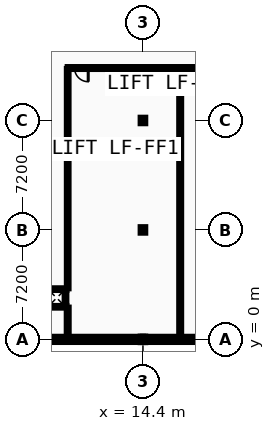
"""IFC4 building model, lengths in metres.
Left out: names, types, materials, properties, quantities, classifications, styles, units other than length and angle.
Written with IfcOpenShell. Run it as: python <this file> out.ifc"""

import sys

from ifc_helpers import new_model, si_unit, direction, frame, frame_2d, origin, origin_2d, place, context, subcontext, project, spatial, rectangle, i_section, extrude, element, fill, save


model = new_model("IFC4")
c1 = context("Model", 3, precision=1e-05, world=origin(), true_north=direction((0.0, 1.0)))
c2 = subcontext(c1, "Body", "Model", "MODEL_VIEW")
j1 = project(units=[si_unit("LENGTHUNIT", "METRE"), si_unit("PLANEANGLEUNIT", "RADIAN")], contexts=[c1])
p1 = place(None, origin())
s1 = spatial("IfcSite", under=j1, at=p1, CompositionType="ELEMENT")
p2 = place(p1, origin())
s2 = spatial("IfcBuilding", under=s1, at=p2, CompositionType="ELEMENT")
p3 = place(p2, frame((0.0, 0.0, 18.4)))
s3 = spatial("IfcBuildingStorey", under=s2, at=p3, CompositionType="ELEMENT", Elevation=18.4)
for number, where, z_axis, x_axis in (
    (1, (14.4, 0.0, 0.0), (0.0, 0.0, 1.0), (1.0, 0.0, 0.0)),
    (2, (14.4, 7.2, 0.0), (0.0, 0.0, 1.0), (1.0, 0.0, 0.0)),
    (3, (14.4, 14.4, 0.0), (0.0, 0.0, 1.0), (1.0, 0.0, 0.0)),
):
    element("IfcColumn", number, at=place(p3, frame(where, z_axis=z_axis, x_axis=x_axis)), inside=s3, PredefinedType="COLUMN", context=c2, shape_type="SweptSolid", body=[
        extrude(i_section(OverallWidth=0.3, OverallDepth=0.36, WebThickness=0.012, FlangeThickness=0.022, FilletRadius=0.027, at=origin_2d()), origin(), (0.0, 0.0, 1.0), 4.4),
    ])
p4 = place(p3, frame((7.2, 0.0, 0.0), z_axis=(0.0, 0.0, 1.0), x_axis=(1.0, 0.0, 0.0)))
e4 = element("IfcWall", 4, at=p4, inside=s3, PredefinedType="STANDARD", context=c2, shape_type="SweptSolid", body=[
    extrude(rectangle(XDim=7.2, YDim=0.34, at=frame_2d((3.6, 0.0))), origin(), (0.0, 0.0, 1.0), 3.95),
])
p5 = place(p4, frame((4.457, 0.0, 0.95)))
e5 = element("IfcOpeningElement", 5, at=p5, cuts=e4, PredefinedType="OPENING", context=c2, shape_type="SweptSolid", body=[
    extrude(rectangle(XDim=1.166, YDim=1.368, at=frame_2d((0.583, 0.684))), frame((0.0, 0.18, 0.0), z_axis=(0.0, -1.0, 0.0), x_axis=(1.0, 0.0, 0.0)), (0.0, 0.0, 1.0), 0.36),
])
p6 = place(p3, frame((14.4, 0.0, 0.0), z_axis=(0.0, 0.0, 1.0), x_axis=(1.0, 0.0, 0.0)))
e6 = element("IfcWall", 6, at=p6, inside=s3, PredefinedType="STANDARD", context=c2, shape_type="SweptSolid", body=[
    extrude(rectangle(XDim=7.2, YDim=0.34, at=frame_2d((3.6, 0.0))), origin(), (0.0, 0.0, 1.0), 3.95),
])
p7 = place(p6, frame((4.44, 0.0, 0.95)))
e7 = element("IfcOpeningElement", 7, at=p7, cuts=e6, PredefinedType="OPENING", context=c2, shape_type="SweptSolid", body=[
    extrude(rectangle(XDim=1.2, YDim=1.368, at=frame_2d((0.6, 0.684))), frame((0.0, 0.18, 0.0), z_axis=(0.0, -1.0, 0.0), x_axis=(1.0, 0.0, 0.0)), (0.0, 0.0, 1.0), 0.36),
])
for number, where, z_axis, x_axis in (
    (8, (8.09, 2.145, 0.0), (0.0, 0.0, 1.0), (1.0, 0.0, 0.0)),
    (9, (8.09, 3.305, 0.0), (0.0, 0.0, 1.0), (1.0, 0.0, 0.0)),
):
    element("IfcWall", number, at=place(p3, frame(where, z_axis=z_axis, x_axis=x_axis)), inside=s3, PredefinedType="PARTITIONING", context=c2, shape_type="SweptSolid", body=[
        extrude(rectangle(XDim=1.27, YDim=0.11, at=frame_2d((0.635, 0.0))), origin(), (0.0, 0.0, 1.0), 4.215),
    ])
p8 = place(p3, frame((9.305, 2.2, 0.0), z_axis=(0.0, 0.0, 1.0), x_axis=(0.0, 1.0, 0.0)))
e10 = element("IfcWall", 10, at=p8, inside=s3, PredefinedType="PARTITIONING", context=c2, shape_type="SweptSolid", body=[
    extrude(rectangle(XDim=1.05, YDim=0.11, at=frame_2d((0.525, 0.0))), origin(), (0.0, 0.0, 1.0), 4.215),
])
p9 = place(p3, frame((9.45, 17.85, 0.0), z_axis=(0.0, 0.0, 1.0), x_axis=(1.0, 0.0, 0.0)))
e11 = element("IfcWall", 11, at=p9, inside=s3, PredefinedType="PARTITIONING", context=c2, shape_type="SweptSolid", body=[
    extrude(rectangle(XDim=12.75, YDim=0.125, at=frame_2d((6.375, 0.0))), origin(), (0.0, 0.0, 1.0), 4.215),
])
p10 = place(p9, frame((7.85, 0.0, 0.0)))
e12 = element("IfcOpeningElement", 12, at=p10, cuts=e11, PredefinedType="OPENING", context=c2, shape_type="SweptSolid", body=[
    extrude(rectangle(XDim=1.0, YDim=2.1, at=frame_2d((0.5, 1.05))), frame((0.0, 0.073, 0.0), z_axis=(0.0, -1.0, 0.0), x_axis=(1.0, 0.0, 0.0)), (0.0, 0.0, 1.0), 0.145),
])
p11 = place(p9, frame((0.45, 0.0, 0.0)))
e13 = element("IfcOpeningElement", 13, at=p11, cuts=e11, PredefinedType="OPENING", context=c2, shape_type="SweptSolid", body=[
    extrude(rectangle(XDim=0.9, YDim=2.1, at=frame_2d((0.45, 1.05))), frame((0.0, 0.073, 0.0), z_axis=(0.0, -1.0, 0.0), x_axis=(1.0, 0.0, 0.0)), (0.0, 0.0, 1.0), 0.145),
])
p12 = place(p3, frame((9.45, 0.2, 0.0), z_axis=(0.0, 0.0, 1.0), x_axis=(0.0, 1.0, 0.0)))
e14 = element("IfcWall", 14, at=p12, inside=s3, PredefinedType="PARTITIONING", context=c2, shape_type="SweptSolid", body=[
    extrude(rectangle(XDim=1.89, YDim=0.125, at=frame_2d((0.945, 0.0))), origin(), (0.0, 0.0, 1.0), 3.96),
])
p13 = place(p3, frame((9.45, 3.36, 0.0), z_axis=(0.0, 0.0, 1.0), x_axis=(0.0, 1.0, 0.0)))
e15 = element("IfcWall", 15, at=p13, inside=s3, PredefinedType="PARTITIONING", context=c2, shape_type="SweptSolid", body=[
    extrude(rectangle(XDim=14.427, YDim=0.11, at=frame_2d((7.214, 0.0))), origin(), (0.0, 0.0, 1.0), 3.96),
])
p14 = place(p3, frame((16.85, 0.2, 0.0), z_axis=(0.0, 0.0, 1.0), x_axis=(0.0, 1.0, 0.0)))
e16 = element("IfcWall", 16, at=p14, inside=s3, PredefinedType="PARTITIONING", context=c2, shape_type="SweptSolid", body=[
    extrude(rectangle(XDim=17.588, YDim=0.125, at=frame_2d((8.794, 0.0))), origin(), (0.0, 0.0, 1.0), 3.96),
])
p15 = place(p5, origin())
e17 = element("IfcWindow", 17, at=p15, inside=s3, PartitioningType="SINGLE_PANEL", PredefinedType="WINDOW", context=c2, shape_type="SweptSolid", body=[
    extrude(rectangle(XDim=1.166, YDim=1.368, at=frame_2d((0.583, 0.684))), frame((0.0, 0.03, 0.0), z_axis=(0.0, -1.0, 0.0), x_axis=(1.0, 0.0, 0.0)), (0.0, 0.0, 1.0), 0.06),
])
fill(e5, e17)
p16 = place(p10, origin())
e18 = element("IfcDoor", 18, at=p16, inside=s3, OperationType="SLIDING_TO_LEFT", PredefinedType="DOOR", context=c2, shape_type="SweptSolid", body=[
    extrude(rectangle(XDim=1.0, YDim=2.1, at=frame_2d((0.5, 1.05))), frame((0.0, 0.025, 0.0), z_axis=(0.0, -1.0, 0.0), x_axis=(1.0, 0.0, 0.0)), (0.0, 0.0, 1.0), 0.05),
])
fill(e12, e18)
p17 = place(p11, origin())
e19 = element("IfcDoor", 19, at=p17, inside=s3, OperationType="SINGLE_SWING_RIGHT", PredefinedType="DOOR", context=c2, shape_type="SweptSolid", body=[
    extrude(rectangle(XDim=0.9, YDim=2.1, at=frame_2d((0.45, 1.05))), frame((0.0, 0.025, 0.0), z_axis=(0.0, -1.0, 0.0), x_axis=(1.0, 0.0, 0.0)), (0.0, 0.0, 1.0), 0.05),
])
fill(e13, e19)
save(model, sys.argv[1])
